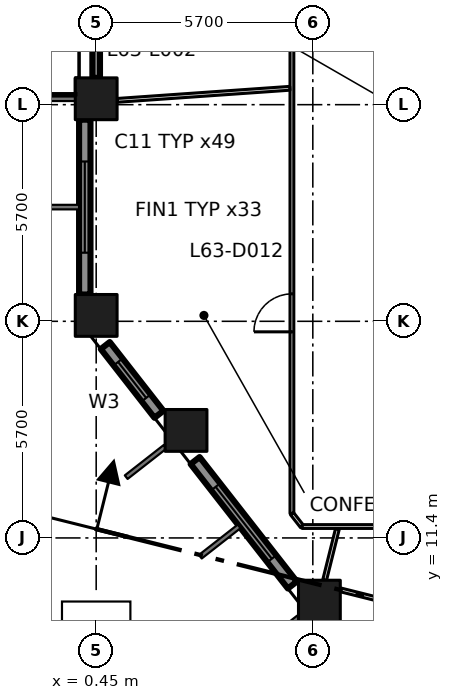
"""IFC4 building model, lengths in metres.
Left out: names, types, materials, properties, quantities, classifications, styles, units other than length and angle.
Written with IfcOpenShell. Run it as: python <this file> out.ifc"""

import sys

from ifc_helpers import new_model, si_unit, direction, frame, frame_2d, origin, origin_2d, place, context, subcontext, project, spatial, rectangle, extrude, element, fill, save


model = new_model("IFC4")
c1 = context("Model", 3, precision=1e-05, world=origin(), true_north=direction((0.0, 1.0)))
c2 = subcontext(c1, "Body", "Model", "MODEL_VIEW")
j1 = project(units=[si_unit("LENGTHUNIT", "METRE"), si_unit("PLANEANGLEUNIT", "RADIAN")], contexts=[c1])
p1 = place(None, origin())
s1 = spatial("IfcSite", under=j1, at=p1, CompositionType="ELEMENT")
p2 = place(p1, origin())
s2 = spatial("IfcBuilding", under=s1, at=p2, CompositionType="ELEMENT")
p3 = place(p2, frame((0.0, 0.0, 276.0)))
s3 = spatial("IfcBuildingStorey", under=s2, at=p3, CompositionType="ELEMENT", Elevation=276.0)
for number, where, z_axis, x_axis in (
    (1, (0.45, 17.255, 0.0), (0.0, 0.0, 1.0), (1.0, 0.0, 0.0)),
    (2, (0.45, 22.955, 0.0), (0.0, 0.0, 1.0), (1.0, 0.0, 0.0)),
    (3, (6.323, 9.737, 0.0), (0.0, 0.0, 1.0), (1.0, 0.0, 0.0)),
    (4, (2.814, 14.229, 0.0), (0.0, 0.0, 1.0), (1.0, 0.0, 0.0)),
):
    element("IfcColumn", number, at=place(p3, frame(where, z_axis=z_axis, x_axis=x_axis)), inside=s3, PredefinedType="COLUMN", context=c2, shape_type="SweptSolid", body=[
        extrude(rectangle(XDim=1.1, YDim=1.1, at=origin_2d()), origin(), (0.0, 0.0, 1.0), 4.2),
    ])
p4 = place(p3, frame((0.45, 28.105, 0.0), z_axis=(0.0, 0.0, 1.0), x_axis=(0.0, -1.0, 0.0)))
e5 = element("IfcWall", 5, at=p4, inside=s3, PredefinedType="SOLIDWALL", context=c2, shape_type="SweptSolid", body=[
    extrude(rectangle(XDim=4.6, YDim=0.2, at=frame_2d((2.3, 0.0))), origin(), (0.0, 0.0, 1.0), 3.15),
])
p5 = place(p4, frame((1.4, 0.0, 0.0)))
e6 = element("IfcOpeningElement", 6, at=p5, cuts=e5, PredefinedType="OPENING", context=c2, shape_type="SweptSolid", body=[
    extrude(rectangle(XDim=1.8, YDim=2.9, at=frame_2d((0.9, 1.45))), frame((0.0, 0.11, 0.0), z_axis=(0.0, -1.0, 0.0), x_axis=(1.0, 0.0, 0.0)), (0.0, 0.0, 1.0), 0.22),
])
p6 = place(p3, frame((-0.88, 28.485, 0.0), z_axis=(0.0, 0.0, 1.0), x_axis=(0.0, -1.0, 0.0)))
e7 = element("IfcWall", 7, at=p6, inside=s3, PredefinedType="SOLIDWALL", context=c2, shape_type="SweptSolid", body=[
    extrude(rectangle(XDim=5.36, YDim=0.4, at=frame_2d((2.68, 0.0))), origin(), (0.0, 0.0, 1.0), 0.3),
])
p7 = place(p3, frame((0.15, 22.405, 0.0), z_axis=(0.0, 0.0, 1.0), x_axis=(0.0, -1.0, 0.0)))
e8 = element("IfcWall", 8, at=p7, inside=s3, PredefinedType="SOLIDWALL", context=c2, shape_type="SweptSolid", body=[
    extrude(rectangle(XDim=4.6, YDim=0.3, at=frame_2d((2.3, 0.0))), origin(), (0.0, 0.0, 1.0), 3.15),
])
p8 = place(p7, frame((1.1, 0.0, 0.8)))
e9 = element("IfcOpeningElement", 9, at=p8, cuts=e8, PredefinedType="OPENING", context=c2, shape_type="SweptSolid", body=[
    extrude(rectangle(XDim=2.4, YDim=2.1, at=frame_2d((1.2, 1.05))), frame((0.0, 0.16, 0.0), z_axis=(0.0, -1.0, 0.0), x_axis=(1.0, 0.0, 0.0)), (0.0, 0.0, 1.0), 0.32),
])
p9 = place(p3, frame((0.689, 16.462, 0.0), z_axis=(0.0, 0.0, 1.0), x_axis=(0.615625465473, -0.788038886262, 0.0)))
e10 = element("IfcWall", 10, at=p9, inside=s3, PredefinedType="SOLIDWALL", context=c2, shape_type="SweptSolid", body=[
    extrude(rectangle(XDim=2.295, YDim=0.3, at=frame_2d((1.148, 0.0))), origin(), (0.0, 0.0, 1.0), 3.15),
])
p10 = place(p9, frame((0.548, 0.0, 0.8)))
e11 = element("IfcOpeningElement", 11, at=p10, cuts=e10, PredefinedType="OPENING", context=c2, shape_type="SweptSolid", body=[
    extrude(rectangle(XDim=1.2, YDim=2.1, at=frame_2d((0.6, 1.05))), frame((0.0, 0.16, 0.0), z_axis=(0.0, -1.0, 0.0), x_axis=(1.0, 0.0, 0.0)), (0.0, 0.0, 1.0), 0.32),
])
p11 = place(p3, frame((3.053, 13.436, 0.0), z_axis=(0.0, 0.0, 1.0), x_axis=(0.615699893917, -0.787980736205, 0.0)))
e12 = element("IfcWall", 12, at=p11, inside=s3, PredefinedType="SOLIDWALL", context=c2, shape_type="SweptSolid", body=[
    extrude(rectangle(XDim=4.156, YDim=0.3, at=frame_2d((2.078, 0.0))), origin(), (0.0, 0.0, 1.0), 3.15),
])
p12 = place(p11, frame((0.878, 0.0, 0.8)))
e13 = element("IfcOpeningElement", 13, at=p12, cuts=e12, PredefinedType="OPENING", context=c2, shape_type="SweptSolid", body=[
    extrude(rectangle(XDim=2.4, YDim=2.1, at=frame_2d((1.2, 1.05))), frame((0.0, 0.16, 0.0), z_axis=(0.0, -1.0, 0.0), x_axis=(1.0, 0.0, 0.0)), (0.0, 0.0, 1.0), 0.32),
])
p13 = place(p3, frame((5.6, 12.043, 0.0), z_axis=(0.0, 0.0, 1.0), x_axis=(0.0, 1.0, 0.0)))
e14 = element("IfcWall", 14, at=p13, inside=s3, PredefinedType="PARTITIONING", context=c2, shape_type="SweptSolid", body=[
    extrude(rectangle(XDim=27.257, YDim=0.1, at=frame_2d((13.628, 0.0))), origin(), (0.0, 0.0, 1.0), 3.9),
])
p14 = place(p13, frame((4.78, 0.0, 0.0)))
e15 = element("IfcOpeningElement", 15, at=p14, cuts=e14, PredefinedType="OPENING", context=c2, shape_type="SweptSolid", body=[
    extrude(rectangle(XDim=1.0, YDim=2.1, at=frame_2d((0.5, 1.05))), frame((0.0, 0.06, 0.0), z_axis=(0.0, -1.0, 0.0), x_axis=(1.0, 0.0, 0.0)), (0.0, 0.0, 1.0), 0.12),
])
p15 = place(p13, frame((13.768, 0.0, 0.0)))
e16 = element("IfcOpeningElement", 16, at=p15, cuts=e14, PredefinedType="OPENING", context=c2, shape_type="SweptSolid", body=[
    extrude(rectangle(XDim=1.0, YDim=2.1, at=frame_2d((0.5, 1.05))), frame((0.0, 0.06, 0.0), z_axis=(0.0, -1.0, 0.0), x_axis=(1.0, 0.0, 0.0)), (0.0, 0.0, 1.0), 0.12),
])
p16 = place(p13, frame((19.368, 0.0, 0.0)))
e17 = element("IfcOpeningElement", 17, at=p16, cuts=e14, PredefinedType="OPENING", context=c2, shape_type="SweptSolid", body=[
    extrude(rectangle(XDim=1.0, YDim=2.1, at=frame_2d((0.5, 1.05))), frame((0.0, 0.06, 0.0), z_axis=(0.0, -1.0, 0.0), x_axis=(1.0, 0.0, 0.0)), (0.0, 0.0, 1.0), 0.12),
])
p17 = place(p13, frame((24.368, 0.0, 0.0)))
e18 = element("IfcOpeningElement", 18, at=p17, cuts=e14, PredefinedType="OPENING", context=c2, shape_type="SweptSolid", body=[
    extrude(rectangle(XDim=1.0, YDim=2.1, at=frame_2d((0.5, 1.05))), frame((0.0, 0.06, 0.0), z_axis=(0.0, -1.0, 0.0), x_axis=(1.0, 0.0, 0.0)), (0.0, 0.0, 1.0), 0.12),
])
p18 = place(p3, frame((5.6, 12.043, 0.0), z_axis=(0.0, 0.0, 1.0), x_axis=(0.615415398102, -0.788202948344, 0.0)))
e19 = element("IfcWall", 19, at=p18, inside=s3, PredefinedType="PARTITIONING", context=c2, shape_type="SweptSolid", body=[
    extrude(rectangle(XDim=0.435, YDim=0.1, at=frame_2d((0.218, 0.0))), origin(), (0.0, 0.0, 1.0), 3.9),
])
p19 = place(p3, frame((5.868, 11.7, 0.0), z_axis=(0.0, 0.0, 1.0), x_axis=(1.0, 0.0, 0.0)))
e20 = element("IfcWall", 20, at=p19, inside=s3, PredefinedType="PARTITIONING", context=c2, shape_type="SweptSolid", body=[
    extrude(rectangle(XDim=4.032, YDim=0.1, at=frame_2d((2.016, 0.0))), origin(), (0.0, 0.0, 1.0), 3.9),
])
p20 = place(p3, frame((5.547, 23.231, 0.0), z_axis=(0.0, 0.0, 1.0), x_axis=(-0.997565491957, -0.069735853451, 0.0)))
e21 = element("IfcWall", 21, at=p20, inside=s3, PredefinedType="PARTITIONING", context=c2, shape_type="SweptSolid", body=[
    extrude(rectangle(XDim=4.558, YDim=0.1, at=frame_2d((2.279, 0.0))), origin(), (0.0, 0.0, 1.0), 3.9),
])
p21 = place(p3, frame((6.797, 11.638, 0.0), z_axis=(0.0, 0.0, 1.0), x_axis=(-0.242164268782, -0.970235263699, 0.0)))
e22 = element("IfcWall", 22, at=p21, inside=s3, PredefinedType="PARTITIONING", context=c2, shape_type="SweptSolid", body=[
    extrude(rectangle(XDim=1.392, YDim=0.1, at=frame_2d((0.696, 0.0))), origin(), (0.0, 0.0, 1.0), 3.9),
])
p22 = place(p3, frame((8.72, 9.574, 0.0), z_axis=(0.0, 0.0, 1.0), x_axis=(-0.970240497311, 0.242143299263, 0.0)))
e23 = element("IfcWall", 23, at=p22, inside=s3, PredefinedType="PARTITIONING", context=c2, shape_type="SweptSolid", body=[
    extrude(rectangle(XDim=1.904, YDim=0.1, at=frame_2d((0.952, 0.0))), origin(), (0.0, 0.0, 1.0), 3.9),
])
p23 = place(p8, origin())
e24 = element("IfcWindow", 24, at=p23, inside=s3, PartitioningType="DOUBLE_PANEL_VERTICAL", PredefinedType="WINDOW", context=c2, shape_type="SweptSolid", body=[
    extrude(rectangle(XDim=2.4, YDim=2.1, at=frame_2d((1.2, 1.05))), frame((0.0, 0.03, 0.0), z_axis=(0.0, -1.0, 0.0), x_axis=(1.0, 0.0, 0.0)), (0.0, 0.0, 1.0), 0.06),
])
fill(e9, e24)
p24 = place(p10, origin())
e25 = element("IfcWindow", 25, at=p24, inside=s3, PartitioningType="SINGLE_PANEL", PredefinedType="WINDOW", context=c2, shape_type="SweptSolid", body=[
    extrude(rectangle(XDim=1.2, YDim=2.1, at=frame_2d((0.6, 1.05))), frame((0.0, 0.03, 0.0), z_axis=(0.0, -1.0, 0.0), x_axis=(1.0, 0.0, 0.0)), (0.0, 0.0, 1.0), 0.06),
])
fill(e11, e25)
p25 = place(p12, origin())
e26 = element("IfcWindow", 26, at=p25, inside=s3, PartitioningType="DOUBLE_PANEL_VERTICAL", PredefinedType="WINDOW", context=c2, shape_type="SweptSolid", body=[
    extrude(rectangle(XDim=2.4, YDim=2.1, at=frame_2d((1.2, 1.05))), frame((0.0, 0.03, 0.0), z_axis=(0.0, -1.0, 0.0), x_axis=(1.0, 0.0, 0.0)), (0.0, 0.0, 1.0), 0.06),
])
fill(e13, e26)
p26 = place(p14, origin())
e27 = element("IfcDoor", 27, at=p26, inside=s3, OperationType="SINGLE_SWING_LEFT", PredefinedType="DOOR", context=c2, shape_type="SweptSolid", body=[
    extrude(rectangle(XDim=1.0, YDim=2.1, at=frame_2d((0.5, 1.05))), frame((0.0, 0.025, 0.0), z_axis=(0.0, -1.0, 0.0), x_axis=(1.0, 0.0, 0.0)), (0.0, 0.0, 1.0), 0.05),
])
fill(e15, e27)
save(model, sys.argv[1])
